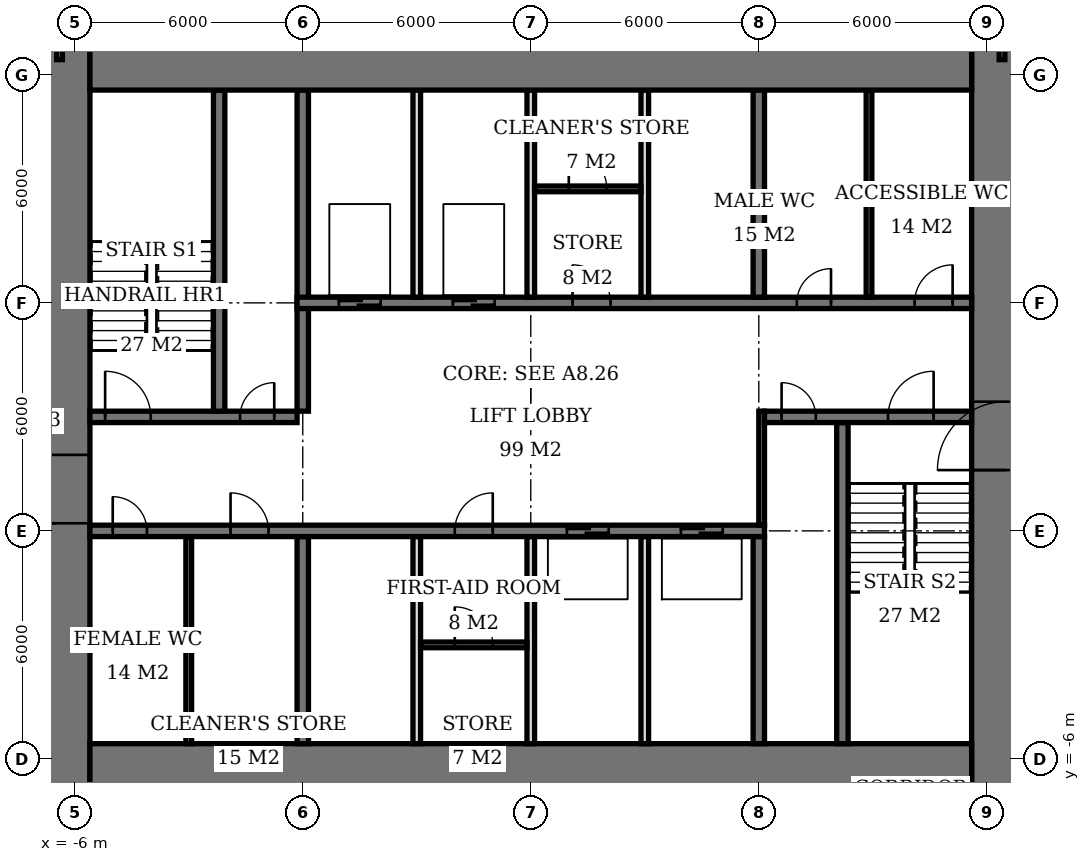
"""IFC4 building model, lengths in metres.
Left out: names, types, materials, properties, quantities, classifications, styles, units other than length and angle.
Written with IfcOpenShell. Run it as: python <this file> out.ifc"""

import sys

from ifc_helpers import new_model, si_unit, direction, frame, frame_2d, origin, place, context, subcontext, project, spatial, rectangle, extrude, element, fill, save


model = new_model("IFC4")
c1 = context("Model", 3, precision=1e-05, world=origin(), true_north=direction((0.0, 1.0)))
c2 = subcontext(c1, "Body", "Model", "MODEL_VIEW")
j1 = project(units=[si_unit("LENGTHUNIT", "METRE"), si_unit("PLANEANGLEUNIT", "RADIAN")], contexts=[c1])
p1 = place(None, origin())
s1 = spatial("IfcSite", under=j1, at=p1, CompositionType="ELEMENT")
p2 = place(p1, origin())
s2 = spatial("IfcBuilding", under=s1, at=p2, CompositionType="ELEMENT")
p3 = place(p2, frame((0.0, 0.0, 181.1)))
s3 = spatial("IfcBuildingStorey", under=s2, at=p3, CompositionType="ELEMENT", Elevation=181.1)
for number, where, z_axis, x_axis in (
    (1, (-5.6, -6.6, 0.0), (0.0, 0.0, 1.0), (1.0, 0.0, 0.0)),
    (2, (-5.6, 12.6, 0.0), (0.0, 0.0, 1.0), (1.0, 0.0, 0.0)),
):
    element("IfcWall", number, at=place(p3, frame(where, z_axis=z_axis, x_axis=x_axis)), inside=s3, PredefinedType="SHEAR", context=c2, shape_type="SweptSolid", body=[
        extrude(rectangle(XDim=23.2, YDim=2.0, at=frame_2d((11.6, 0.0))), origin(), (0.0, 0.0, 1.0), 3.9),
    ])
p4 = place(p3, frame((-6.5, -7.6, 0.0), z_axis=(0.0, 0.0, 1.0), x_axis=(0.0, 1.0, 0.0)))
e3 = element("IfcWall", 3, at=p4, inside=s3, PredefinedType="SHEAR", context=c2, shape_type="SweptSolid", body=[
    extrude(rectangle(XDim=21.2, YDim=1.8, at=frame_2d((10.6, 0.0))), origin(), (0.0, 0.0, 1.0), 3.9),
])
p5 = place(p4, frame((7.8, 0.0, 0.0)))
e4 = element("IfcOpeningElement", 4, at=p5, cuts=e3, PredefinedType="OPENING", context=c2, shape_type="SweptSolid", body=[
    extrude(rectangle(XDim=1.8, YDim=2.4, at=frame_2d((0.9, 1.2))), frame((0.0, 0.91, 0.0), z_axis=(0.0, -1.0, 0.0), x_axis=(1.0, 0.0, 0.0)), (0.0, 0.0, 1.0), 1.82),
])
p6 = place(p3, frame((18.5, -7.6, 0.0), z_axis=(0.0, 0.0, 1.0), x_axis=(0.0, 1.0, 0.0)))
e5 = element("IfcWall", 5, at=p6, inside=s3, PredefinedType="SHEAR", context=c2, shape_type="SweptSolid", body=[
    extrude(rectangle(XDim=21.2, YDim=1.8, at=frame_2d((10.6, 0.0))), origin(), (0.0, 0.0, 1.0), 3.9),
])
p7 = place(p6, frame((9.2, 0.0, 0.0)))
e6 = element("IfcOpeningElement", 6, at=p7, cuts=e5, PredefinedType="OPENING", context=c2, shape_type="SweptSolid", body=[
    extrude(rectangle(XDim=1.8, YDim=2.4, at=frame_2d((0.9, 1.2))), frame((0.0, 0.91, 0.0), z_axis=(0.0, -1.0, 0.0), x_axis=(1.0, 0.0, 0.0)), (0.0, 0.0, 1.0), 1.82),
])
p8 = place(p3, frame((-5.6, 0.0, 0.0), z_axis=(0.0, 0.0, 1.0), x_axis=(1.0, 0.0, 0.0)))
e7 = element("IfcWall", 7, at=p8, inside=s3, PredefinedType="SHEAR", context=c2, shape_type="SweptSolid", body=[
    extrude(rectangle(XDim=17.75, YDim=0.3, at=frame_2d((8.875, 0.0))), origin(), (0.0, 0.0, 1.0), 3.9),
])
p9 = place(p8, frame((0.6, 0.0, 0.0)))
e8 = element("IfcOpeningElement", 8, at=p9, cuts=e7, PredefinedType="OPENING", context=c2, shape_type="SweptSolid", body=[
    extrude(rectangle(XDim=0.9, YDim=2.1, at=frame_2d((0.45, 1.05))), frame((0.0, 0.16, 0.0), z_axis=(0.0, -1.0, 0.0), x_axis=(1.0, 0.0, 0.0)), (0.0, 0.0, 1.0), 0.32),
])
p10 = place(p8, frame((3.7, 0.0, 0.0)))
e9 = element("IfcOpeningElement", 9, at=p10, cuts=e7, PredefinedType="OPENING", context=c2, shape_type="SweptSolid", body=[
    extrude(rectangle(XDim=1.0, YDim=2.1, at=frame_2d((0.5, 1.05))), frame((0.0, 0.16, 0.0), z_axis=(0.0, -1.0, 0.0), x_axis=(1.0, 0.0, 0.0)), (0.0, 0.0, 1.0), 0.32),
])
p11 = place(p8, frame((9.6, 0.0, 0.0)))
e10 = element("IfcOpeningElement", 10, at=p11, cuts=e7, PredefinedType="OPENING", context=c2, shape_type="SweptSolid", body=[
    extrude(rectangle(XDim=1.0, YDim=2.1, at=frame_2d((0.5, 1.05))), frame((0.0, 0.16, 0.0), z_axis=(0.0, -1.0, 0.0), x_axis=(1.0, 0.0, 0.0)), (0.0, 0.0, 1.0), 0.32),
])
p12 = place(p8, frame((12.55, 0.0, 0.0)))
e11 = element("IfcOpeningElement", 11, at=p12, cuts=e7, PredefinedType="OPENING", context=c2, shape_type="SweptSolid", body=[
    extrude(rectangle(XDim=1.1, YDim=2.1, at=frame_2d((0.55, 1.05))), frame((0.0, 0.16, 0.0), z_axis=(0.0, -1.0, 0.0), x_axis=(1.0, 0.0, 0.0)), (0.0, 0.0, 1.0), 0.32),
])
p13 = place(p8, frame((15.55, 0.0, 0.0)))
e12 = element("IfcOpeningElement", 12, at=p13, cuts=e7, PredefinedType="OPENING", context=c2, shape_type="SweptSolid", body=[
    extrude(rectangle(XDim=1.1, YDim=2.1, at=frame_2d((0.55, 1.05))), frame((0.0, 0.16, 0.0), z_axis=(0.0, -1.0, 0.0), x_axis=(1.0, 0.0, 0.0)), (0.0, 0.0, 1.0), 0.32),
])
p14 = place(p3, frame((-5.6, 3.0, 0.0), z_axis=(0.0, 0.0, 1.0), x_axis=(1.0, 0.0, 0.0)))
e13 = element("IfcWall", 13, at=p14, inside=s3, PredefinedType="SHEAR", context=c2, shape_type="SweptSolid", body=[
    extrude(rectangle(XDim=5.45, YDim=0.3, at=frame_2d((2.725, 0.0))), origin(), (0.0, 0.0, 1.0), 3.9),
])
p15 = place(p14, frame((0.4, 0.0, 0.0)))
e14 = element("IfcOpeningElement", 14, at=p15, cuts=e13, PredefinedType="OPENING", context=c2, shape_type="SweptSolid", body=[
    extrude(rectangle(XDim=1.2, YDim=2.1, at=frame_2d((0.6, 1.05))), frame((0.0, 0.16, 0.0), z_axis=(0.0, -1.0, 0.0), x_axis=(1.0, 0.0, 0.0)), (0.0, 0.0, 1.0), 0.32),
])
p16 = place(p14, frame((3.95, 0.0, 0.0)))
e15 = element("IfcOpeningElement", 15, at=p16, cuts=e13, PredefinedType="OPENING", context=c2, shape_type="SweptSolid", body=[
    extrude(rectangle(XDim=0.9, YDim=2.1, at=frame_2d((0.45, 1.05))), frame((0.0, 0.16, 0.0), z_axis=(0.0, -1.0, 0.0), x_axis=(1.0, 0.0, 0.0)), (0.0, 0.0, 1.0), 0.32),
])
p17 = place(p3, frame((12.15, 3.0, 0.0), z_axis=(0.0, 0.0, 1.0), x_axis=(1.0, 0.0, 0.0)))
e16 = element("IfcWall", 16, at=p17, inside=s3, PredefinedType="SHEAR", context=c2, shape_type="SweptSolid", body=[
    extrude(rectangle(XDim=5.45, YDim=0.3, at=frame_2d((2.725, 0.0))), origin(), (0.0, 0.0, 1.0), 3.9),
])
p18 = place(p17, frame((3.25, 0.0, 0.0)))
e17 = element("IfcOpeningElement", 17, at=p18, cuts=e16, PredefinedType="OPENING", context=c2, shape_type="SweptSolid", body=[
    extrude(rectangle(XDim=1.2, YDim=2.1, at=frame_2d((0.6, 1.05))), frame((0.0, 0.16, 0.0), z_axis=(0.0, -1.0, 0.0), x_axis=(1.0, 0.0, 0.0)), (0.0, 0.0, 1.0), 0.32),
])
p19 = place(p17, frame((0.45, 0.0, 0.0)))
e18 = element("IfcOpeningElement", 18, at=p19, cuts=e16, PredefinedType="OPENING", context=c2, shape_type="SweptSolid", body=[
    extrude(rectangle(XDim=0.9, YDim=2.1, at=frame_2d((0.45, 1.05))), frame((0.0, 0.16, 0.0), z_axis=(0.0, -1.0, 0.0), x_axis=(1.0, 0.0, 0.0)), (0.0, 0.0, 1.0), 0.32),
])
p20 = place(p3, frame((-0.15, 6.0, 0.0), z_axis=(0.0, 0.0, 1.0), x_axis=(1.0, 0.0, 0.0)))
e19 = element("IfcWall", 19, at=p20, inside=s3, PredefinedType="SHEAR", context=c2, shape_type="SweptSolid", body=[
    extrude(rectangle(XDim=17.75, YDim=0.3, at=frame_2d((8.875, 0.0))), origin(), (0.0, 0.0, 1.0), 3.9),
])
p21 = place(p20, frame((13.15, 0.0, 0.0)))
e20 = element("IfcOpeningElement", 20, at=p21, cuts=e19, PredefinedType="OPENING", context=c2, shape_type="SweptSolid", body=[
    extrude(rectangle(XDim=0.9, YDim=2.1, at=frame_2d((0.45, 1.05))), frame((0.0, 0.16, 0.0), z_axis=(0.0, -1.0, 0.0), x_axis=(1.0, 0.0, 0.0)), (0.0, 0.0, 1.0), 0.32),
])
p22 = place(p20, frame((16.25, 0.0, 0.0)))
e21 = element("IfcOpeningElement", 21, at=p22, cuts=e19, PredefinedType="OPENING", context=c2, shape_type="SweptSolid", body=[
    extrude(rectangle(XDim=1.0, YDim=2.1, at=frame_2d((0.5, 1.05))), frame((0.0, 0.16, 0.0), z_axis=(0.0, -1.0, 0.0), x_axis=(1.0, 0.0, 0.0)), (0.0, 0.0, 1.0), 0.32),
])
p23 = place(p20, frame((7.25, 0.0, 0.0)))
e22 = element("IfcOpeningElement", 22, at=p23, cuts=e19, PredefinedType="OPENING", context=c2, shape_type="SweptSolid", body=[
    extrude(rectangle(XDim=1.0, YDim=2.1, at=frame_2d((0.5, 1.05))), frame((0.0, 0.16, 0.0), z_axis=(0.0, -1.0, 0.0), x_axis=(1.0, 0.0, 0.0)), (0.0, 0.0, 1.0), 0.32),
])
p24 = place(p20, frame((1.1, 0.0, 0.0)))
e23 = element("IfcOpeningElement", 23, at=p24, cuts=e19, PredefinedType="OPENING", context=c2, shape_type="SweptSolid", body=[
    extrude(rectangle(XDim=1.1, YDim=2.1, at=frame_2d((0.55, 1.05))), frame((0.0, 0.16, 0.0), z_axis=(0.0, -1.0, 0.0), x_axis=(1.0, 0.0, 0.0)), (0.0, 0.0, 1.0), 0.32),
])
p25 = place(p20, frame((4.1, 0.0, 0.0)))
e24 = element("IfcOpeningElement", 24, at=p25, cuts=e19, PredefinedType="OPENING", context=c2, shape_type="SweptSolid", body=[
    extrude(rectangle(XDim=1.1, YDim=2.1, at=frame_2d((0.55, 1.05))), frame((0.0, 0.16, 0.0), z_axis=(0.0, -1.0, 0.0), x_axis=(1.0, 0.0, 0.0)), (0.0, 0.0, 1.0), 0.32),
])
p26 = place(p3, frame((0.0, -5.6, 0.0), z_axis=(0.0, 0.0, 1.0), x_axis=(0.0, 1.0, 0.0)))
e25 = element("IfcWall", 25, at=p26, inside=s3, PredefinedType="SHEAR", context=c2, shape_type="SweptSolid", body=[
    extrude(rectangle(XDim=5.45, YDim=0.3, at=frame_2d((2.725, 0.0))), origin(), (0.0, 0.0, 1.0), 3.9),
])
p27 = place(p3, frame((0.0, 3.15, 0.0), z_axis=(0.0, 0.0, 1.0), x_axis=(0.0, 1.0, 0.0)))
e26 = element("IfcWall", 26, at=p27, inside=s3, PredefinedType="SHEAR", context=c2, shape_type="SweptSolid", body=[
    extrude(rectangle(XDim=8.45, YDim=0.3, at=frame_2d((4.225, 0.0))), origin(), (0.0, 0.0, 1.0), 3.9),
])
for number, where, z_axis, x_axis in (
    (27, (12.0, -5.6, 0.0), (0.0, 0.0, 1.0), (0.0, 1.0, 0.0)),
    (28, (12.0, 6.15, 0.0), (0.0, 0.0, 1.0), (0.0, 1.0, 0.0)),
):
    element("IfcWall", number, at=place(p3, frame(where, z_axis=z_axis, x_axis=x_axis)), inside=s3, PredefinedType="SHEAR", context=c2, shape_type="SweptSolid", body=[
        extrude(rectangle(XDim=5.45, YDim=0.3, at=frame_2d((2.725, 0.0))), origin(), (0.0, 0.0, 1.0), 3.9),
    ])
for number, where, z_axis, x_axis in (
    (29, (-2.2, 3.15, 0.0), (0.0, 0.0, 1.0), (0.0, 1.0, 0.0)),
    (30, (14.2, -5.6, 0.0), (0.0, 0.0, 1.0), (0.0, 1.0, 0.0)),
):
    element("IfcWall", number, at=place(p3, frame(where, z_axis=z_axis, x_axis=x_axis)), inside=s3, PredefinedType="SHEAR", context=c2, shape_type="SweptSolid", body=[
        extrude(rectangle(XDim=8.45, YDim=0.3, at=frame_2d((4.225, 0.0))), origin(), (0.0, 0.0, 1.0), 3.9),
    ])
for number, where, z_axis, x_axis in (
    (31, (3.0, 6.15, 0.0), (0.0, 0.0, 1.0), (0.0, 1.0, 0.0)),
    (32, (6.0, 6.15, 0.0), (0.0, 0.0, 1.0), (0.0, 1.0, 0.0)),
    (33, (9.0, 6.15, 0.0), (0.0, 0.0, 1.0), (0.0, 1.0, 0.0)),
    (34, (3.0, -5.6, 0.0), (0.0, 0.0, 1.0), (0.0, 1.0, 0.0)),
    (35, (6.0, -5.6, 0.0), (0.0, 0.0, 1.0), (0.0, 1.0, 0.0)),
    (36, (9.0, -5.6, 0.0), (0.0, 0.0, 1.0), (0.0, 1.0, 0.0)),
):
    element("IfcWall", number, at=place(p3, frame(where, z_axis=z_axis, x_axis=x_axis)), inside=s3, PredefinedType="SOLIDWALL", context=c2, shape_type="SweptSolid", body=[
        extrude(rectangle(XDim=5.45, YDim=0.2, at=frame_2d((2.725, 0.0))), origin(), (0.0, 0.0, 1.0), 3.9),
    ])
for number, where, z_axis, x_axis in (
    (37, (-3.0, -5.6, 0.0), (0.0, 0.0, 1.0), (0.0, 1.0, 0.0)),
    (38, (14.9, 6.15, 0.0), (0.0, 0.0, 1.0), (0.0, 1.0, 0.0)),
):
    element("IfcWall", number, at=place(p3, frame(where, z_axis=z_axis, x_axis=x_axis)), inside=s3, PredefinedType="PLUMBINGWALL", context=c2, shape_type="SweptSolid", body=[
        extrude(rectangle(XDim=5.45, YDim=0.15, at=frame_2d((2.725, 0.0))), origin(), (0.0, 0.0, 1.0), 3.65),
    ])
p28 = place(p3, frame((6.1, 9.0, 0.0), z_axis=(0.0, 0.0, 1.0), x_axis=(1.0, 0.0, 0.0)))
e39 = element("IfcWall", 39, at=p28, inside=s3, PredefinedType="PARTITIONING", context=c2, shape_type="SweptSolid", body=[
    extrude(rectangle(XDim=2.8, YDim=0.15, at=frame_2d((1.4, 0.0))), origin(), (0.0, 0.0, 1.0), 3.65),
])
p29 = place(p28, frame((0.9, 0.0, 0.0)))
e40 = element("IfcOpeningElement", 40, at=p29, cuts=e39, PredefinedType="OPENING", context=c2, shape_type="SweptSolid", body=[
    extrude(rectangle(XDim=1.0, YDim=2.1, at=frame_2d((0.5, 1.05))), frame((0.0, 0.085, 0.0), z_axis=(0.0, -1.0, 0.0), x_axis=(1.0, 0.0, 0.0)), (0.0, 0.0, 1.0), 0.17),
])
p30 = place(p3, frame((3.1, -3.0, 0.0), z_axis=(0.0, 0.0, 1.0), x_axis=(1.0, 0.0, 0.0)))
e41 = element("IfcWall", 41, at=p30, inside=s3, PredefinedType="PARTITIONING", context=c2, shape_type="SweptSolid", body=[
    extrude(rectangle(XDim=2.8, YDim=0.15, at=frame_2d((1.4, 0.0))), origin(), (0.0, 0.0, 1.0), 3.65),
])
p31 = place(p30, frame((0.9, 0.0, 0.0)))
e42 = element("IfcOpeningElement", 42, at=p31, cuts=e41, PredefinedType="OPENING", context=c2, shape_type="SweptSolid", body=[
    extrude(rectangle(XDim=1.0, YDim=2.1, at=frame_2d((0.5, 1.05))), frame((0.0, 0.085, 0.0), z_axis=(0.0, -1.0, 0.0), x_axis=(1.0, 0.0, 0.0)), (0.0, 0.0, 1.0), 0.17),
])
p32 = place(p3, frame((-6.4, 12.4, 0.0), z_axis=(0.0, 0.0, 1.0), x_axis=(0.0, 1.0, 0.0)))
e43 = element("IfcWall", 43, at=p32, inside=s3, PredefinedType="PARTITIONING", context=c2, shape_type="SweptSolid", body=[
    extrude(rectangle(XDim=1.2, YDim=0.15, at=frame_2d((0.6, 0.0))), origin(), (0.0, 0.0, 1.0), 3.65),
])
p33 = place(p3, frame((10.5, 12.4, 0.0), z_axis=(0.0, 0.0, 1.0), x_axis=(0.0, 1.0, 0.0)))
e44 = element("IfcWall", 44, at=p33, inside=s3, PredefinedType="PARTITIONING", context=c2, shape_type="SweptSolid", body=[
    extrude(rectangle(XDim=7.025, YDim=0.15, at=frame_2d((3.513, 0.0))), origin(), (0.0, 0.0, 1.0), 3.65),
])
p34 = place(p3, frame((18.4, 12.4, 0.0), z_axis=(0.0, 0.0, 1.0), x_axis=(0.0, 1.0, 0.0)))
e45 = element("IfcWall", 45, at=p34, inside=s3, PredefinedType="PARTITIONING", context=c2, shape_type="SweptSolid", body=[
    extrude(rectangle(XDim=1.2, YDim=0.15, at=frame_2d((0.6, 0.0))), origin(), (0.0, 0.0, 1.0), 3.65),
])
p35 = place(p3, frame((12.075, 0.15, 0.0), z_axis=(0.0, 0.0, 1.0), x_axis=(0.0, 1.0, 0.0)))
e46 = element("IfcWall", 46, at=p35, inside=s3, PredefinedType="PARTITIONING", context=c2, shape_type="SweptSolid", body=[
    extrude(rectangle(XDim=3.0, YDim=0.15, at=frame_2d((1.5, 0.0))), origin(), (0.0, 0.0, 1.0), 3.65),
])
p36 = place(p5, origin())
e47 = element("IfcDoor", 47, at=p36, inside=s3, OperationType="DOUBLE_DOOR_SINGLE_SWING", PredefinedType="DOOR", context=c2, shape_type="SweptSolid", body=[
    extrude(rectangle(XDim=1.8, YDim=2.4, at=frame_2d((0.9, 1.2))), frame((0.0, 0.025, 0.0), z_axis=(0.0, -1.0, 0.0), x_axis=(1.0, 0.0, 0.0)), (0.0, 0.0, 1.0), 0.05),
])
fill(e4, e47)
p37 = place(p7, origin())
e48 = element("IfcDoor", 48, at=p37, inside=s3, OperationType="DOUBLE_DOOR_SINGLE_SWING", PredefinedType="DOOR", context=c2, shape_type="SweptSolid", body=[
    extrude(rectangle(XDim=1.8, YDim=2.4, at=frame_2d((0.9, 1.2))), frame((0.0, 0.025, 0.0), z_axis=(0.0, -1.0, 0.0), x_axis=(1.0, 0.0, 0.0)), (0.0, 0.0, 1.0), 0.05),
])
fill(e6, e48)
p38 = place(p15, origin())
e49 = element("IfcDoor", 49, at=p38, inside=s3, OperationType="SINGLE_SWING_LEFT", PredefinedType="DOOR", context=c2, shape_type="SweptSolid", body=[
    extrude(rectangle(XDim=1.2, YDim=2.1, at=frame_2d((0.6, 1.05))), frame((0.0, 0.025, 0.0), z_axis=(0.0, -1.0, 0.0), x_axis=(1.0, 0.0, 0.0)), (0.0, 0.0, 1.0), 0.05),
])
fill(e14, e49)
p39 = place(p16, origin())
e50 = element("IfcDoor", 50, at=p39, inside=s3, OperationType="SINGLE_SWING_RIGHT", PredefinedType="DOOR", context=c2, shape_type="SweptSolid", body=[
    extrude(rectangle(XDim=0.9, YDim=2.1, at=frame_2d((0.45, 1.05))), frame((0.0, 0.025, 0.0), z_axis=(0.0, -1.0, 0.0), x_axis=(1.0, 0.0, 0.0)), (0.0, 0.0, 1.0), 0.05),
])
fill(e15, e50)
p40 = place(p18, origin())
e51 = element("IfcDoor", 51, at=p40, inside=s3, OperationType="SINGLE_SWING_RIGHT", PredefinedType="DOOR", context=c2, shape_type="SweptSolid", body=[
    extrude(rectangle(XDim=1.2, YDim=2.1, at=frame_2d((0.6, 1.05))), frame((0.0, 0.025, 0.0), z_axis=(0.0, -1.0, 0.0), x_axis=(1.0, 0.0, 0.0)), (0.0, 0.0, 1.0), 0.05),
])
fill(e17, e51)
p41 = place(p19, origin())
e52 = element("IfcDoor", 52, at=p41, inside=s3, OperationType="SINGLE_SWING_LEFT", PredefinedType="DOOR", context=c2, shape_type="SweptSolid", body=[
    extrude(rectangle(XDim=0.9, YDim=2.1, at=frame_2d((0.45, 1.05))), frame((0.0, 0.025, 0.0), z_axis=(0.0, -1.0, 0.0), x_axis=(1.0, 0.0, 0.0)), (0.0, 0.0, 1.0), 0.05),
])
fill(e18, e52)
p42 = place(p9, origin())
e53 = element("IfcDoor", 53, at=p42, inside=s3, OperationType="SINGLE_SWING_LEFT", PredefinedType="DOOR", context=c2, shape_type="SweptSolid", body=[
    extrude(rectangle(XDim=0.9, YDim=2.1, at=frame_2d((0.45, 1.05))), frame((0.0, 0.025, 0.0), z_axis=(0.0, -1.0, 0.0), x_axis=(1.0, 0.0, 0.0)), (0.0, 0.0, 1.0), 0.05),
])
fill(e8, e53)
p43 = place(p10, origin())
e54 = element("IfcDoor", 54, at=p43, inside=s3, OperationType="SINGLE_SWING_LEFT", PredefinedType="DOOR", context=c2, shape_type="SweptSolid", body=[
    extrude(rectangle(XDim=1.0, YDim=2.1, at=frame_2d((0.5, 1.05))), frame((0.0, 0.025, 0.0), z_axis=(0.0, -1.0, 0.0), x_axis=(1.0, 0.0, 0.0)), (0.0, 0.0, 1.0), 0.05),
])
fill(e9, e54)
p44 = place(p21, origin())
e55 = element("IfcDoor", 55, at=p44, inside=s3, OperationType="SINGLE_SWING_RIGHT", PredefinedType="DOOR", context=c2, shape_type="SweptSolid", body=[
    extrude(rectangle(XDim=0.9, YDim=2.1, at=frame_2d((0.45, 1.05))), frame((0.0, 0.025, 0.0), z_axis=(0.0, -1.0, 0.0), x_axis=(1.0, 0.0, 0.0)), (0.0, 0.0, 1.0), 0.05),
])
fill(e20, e55)
p45 = place(p22, origin())
e56 = element("IfcDoor", 56, at=p45, inside=s3, OperationType="SINGLE_SWING_RIGHT", PredefinedType="DOOR", context=c2, shape_type="SweptSolid", body=[
    extrude(rectangle(XDim=1.0, YDim=2.1, at=frame_2d((0.5, 1.05))), frame((0.0, 0.025, 0.0), z_axis=(0.0, -1.0, 0.0), x_axis=(1.0, 0.0, 0.0)), (0.0, 0.0, 1.0), 0.05),
])
fill(e21, e56)
p46 = place(p29, origin())
e57 = element("IfcDoor", 57, at=p46, inside=s3, OperationType="SINGLE_SWING_LEFT", PredefinedType="DOOR", context=c2, shape_type="SweptSolid", body=[
    extrude(rectangle(XDim=1.0, YDim=2.1, at=frame_2d((0.5, 1.05))), frame((0.0, 0.025, 0.0), z_axis=(0.0, -1.0, 0.0), x_axis=(1.0, 0.0, 0.0)), (0.0, 0.0, 1.0), 0.05),
])
fill(e40, e57)
p47 = place(p23, origin())
e58 = element("IfcDoor", 58, at=p47, inside=s3, OperationType="SINGLE_SWING_LEFT", PredefinedType="DOOR", context=c2, shape_type="SweptSolid", body=[
    extrude(rectangle(XDim=1.0, YDim=2.1, at=frame_2d((0.5, 1.05))), frame((0.0, 0.025, 0.0), z_axis=(0.0, -1.0, 0.0), x_axis=(1.0, 0.0, 0.0)), (0.0, 0.0, 1.0), 0.05),
])
fill(e22, e58)
p48 = place(p31, origin())
e59 = element("IfcDoor", 59, at=p48, inside=s3, OperationType="SINGLE_SWING_LEFT", PredefinedType="DOOR", context=c2, shape_type="SweptSolid", body=[
    extrude(rectangle(XDim=1.0, YDim=2.1, at=frame_2d((0.5, 1.05))), frame((0.0, 0.025, 0.0), z_axis=(0.0, -1.0, 0.0), x_axis=(1.0, 0.0, 0.0)), (0.0, 0.0, 1.0), 0.05),
])
fill(e42, e59)
p49 = place(p11, origin())
e60 = element("IfcDoor", 60, at=p49, inside=s3, OperationType="SINGLE_SWING_RIGHT", PredefinedType="DOOR", context=c2, shape_type="SweptSolid", body=[
    extrude(rectangle(XDim=1.0, YDim=2.1, at=frame_2d((0.5, 1.05))), frame((0.0, 0.025, 0.0), z_axis=(0.0, -1.0, 0.0), x_axis=(1.0, 0.0, 0.0)), (0.0, 0.0, 1.0), 0.05),
])
fill(e10, e60)
p50 = place(p24, origin())
e61 = element("IfcDoor", 61, at=p50, inside=s3, OperationType="DOUBLE_DOOR_SLIDING", PredefinedType="USERDEFINED", context=c2, shape_type="SweptSolid", body=[
    extrude(rectangle(XDim=1.1, YDim=2.1, at=frame_2d((0.55, 1.05))), frame((0.0, 0.025, 0.0), z_axis=(0.0, -1.0, 0.0), x_axis=(1.0, 0.0, 0.0)), (0.0, 0.0, 1.0), 0.05),
])
fill(e23, e61)
p51 = place(p25, origin())
e62 = element("IfcDoor", 62, at=p51, inside=s3, OperationType="DOUBLE_DOOR_SLIDING", PredefinedType="USERDEFINED", context=c2, shape_type="SweptSolid", body=[
    extrude(rectangle(XDim=1.1, YDim=2.1, at=frame_2d((0.55, 1.05))), frame((0.0, 0.025, 0.0), z_axis=(0.0, -1.0, 0.0), x_axis=(1.0, 0.0, 0.0)), (0.0, 0.0, 1.0), 0.05),
])
fill(e24, e62)
p52 = place(p12, origin())
e63 = element("IfcDoor", 63, at=p52, inside=s3, OperationType="DOUBLE_DOOR_SLIDING", PredefinedType="USERDEFINED", context=c2, shape_type="SweptSolid", body=[
    extrude(rectangle(XDim=1.1, YDim=2.1, at=frame_2d((0.55, 1.05))), frame((0.0, 0.025, 0.0), z_axis=(0.0, -1.0, 0.0), x_axis=(1.0, 0.0, 0.0)), (0.0, 0.0, 1.0), 0.05),
])
fill(e11, e63)
p53 = place(p13, origin())
e64 = element("IfcDoor", 64, at=p53, inside=s3, OperationType="DOUBLE_DOOR_SLIDING", PredefinedType="USERDEFINED", context=c2, shape_type="SweptSolid", body=[
    extrude(rectangle(XDim=1.1, YDim=2.1, at=frame_2d((0.55, 1.05))), frame((0.0, 0.025, 0.0), z_axis=(0.0, -1.0, 0.0), x_axis=(1.0, 0.0, 0.0)), (0.0, 0.0, 1.0), 0.05),
])
fill(e12, e64)
save(model, sys.argv[1])
